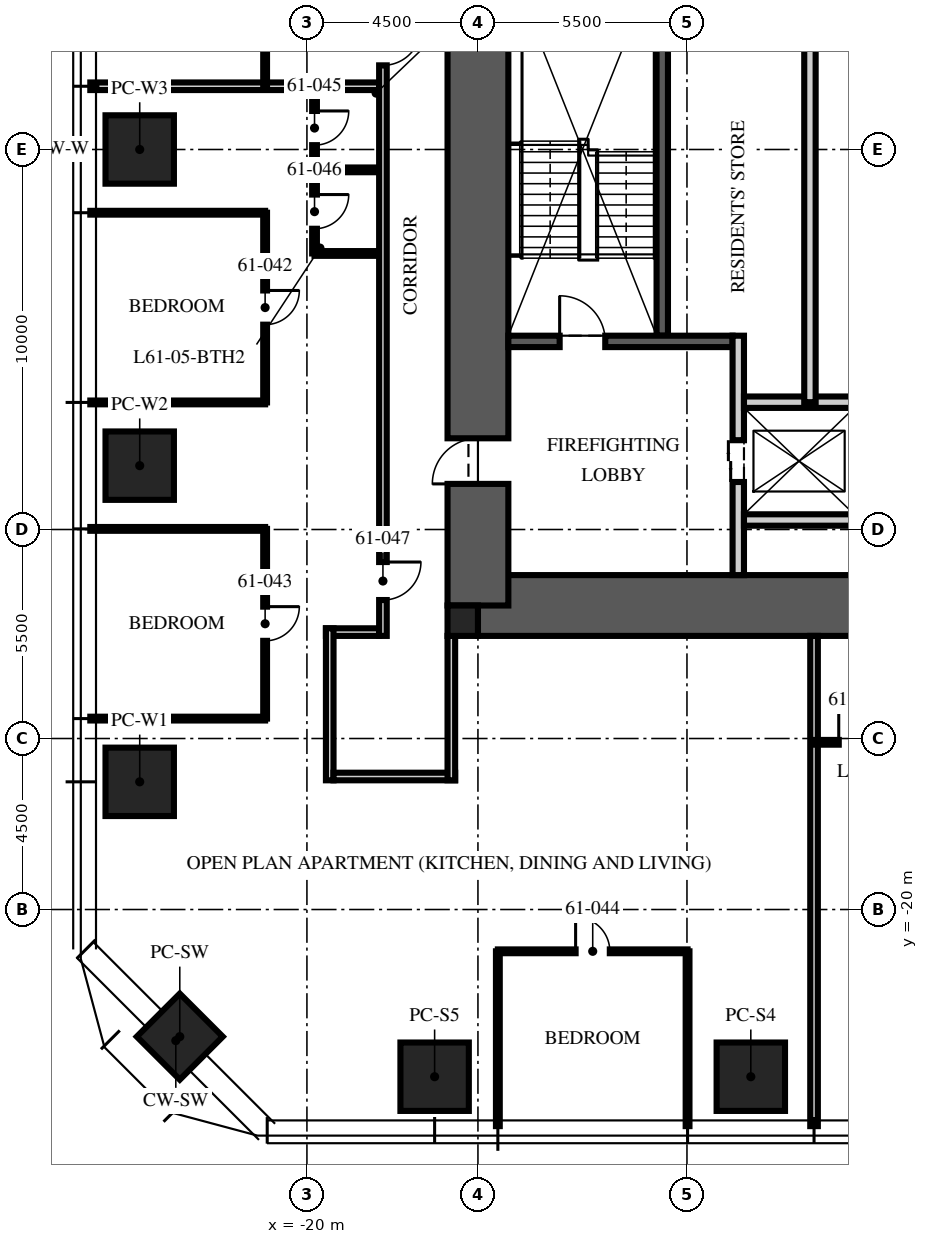
"""IFC4 building model, lengths in metres.
Left out: names, types, materials, properties, quantities, classifications, styles, units other than length and angle.
Written with IfcOpenShell. Run it as: python <this file> out.ifc"""

import sys

from ifc_helpers import new_model, si_unit, direction, frame, frame_2d, origin, origin_2d, place, context, subcontext, project, spatial, rectangle, extrude, element, fill, save


model = new_model("IFC4")
c1 = context("Model", 3, precision=1e-05, world=origin(), true_north=direction((0.0, 1.0)))
c2 = subcontext(c1, "Body", "Model", "MODEL_VIEW")
j1 = project(units=[si_unit("LENGTHUNIT", "METRE"), si_unit("PLANEANGLEUNIT", "RADIAN")], contexts=[c1])
p1 = place(None, origin())
s1 = spatial("IfcSite", under=j1, at=p1, CompositionType="ELEMENT")
p2 = place(p1, origin())
s2 = spatial("IfcBuilding", under=s1, at=p2, CompositionType="ELEMENT")
p3 = place(p2, frame((0.0, 0.0, 244.5)))
s3 = spatial("IfcBuildingStorey", under=s2, at=p3, CompositionType="ELEMENT", Elevation=244.5)
p4 = place(p3, frame((-15.5, -12.0, -0.25), z_axis=(0.0, 0.0, 1.0), x_axis=(1.0, 0.0, 0.0)))
e1 = element("IfcWall", 1, at=p4, inside=s3, PredefinedType="SHEAR", context=c2, shape_type="SweptSolid", body=[
    extrude(rectangle(XDim=31.0, YDim=1.6, at=frame_2d((15.5, 0.0))), origin(), (0.0, 0.0, 1.0), 3.75),
])
p5 = place(p3, frame((-15.5, -12.0, -0.25), z_axis=(0.0, 0.0, 1.0), x_axis=(0.0, 1.0, 0.0)))
e2 = element("IfcWall", 2, at=p5, inside=s3, PredefinedType="SHEAR", context=c2, shape_type="SweptSolid", body=[
    extrude(rectangle(XDim=24.0, YDim=1.6, at=frame_2d((12.0, 0.0))), origin(), (0.0, 0.0, 1.0), 3.75),
])
p6 = place(p5, frame((3.2, 0.0, 0.25)))
e3 = element("IfcOpeningElement", 3, at=p6, cuts=e2, PredefinedType="OPENING", context=c2, shape_type="SweptSolid", body=[
    extrude(rectangle(XDim=1.2, YDim=2.1, at=frame_2d((0.6, 1.05))), frame((0.0, 0.81, 0.0), z_axis=(0.0, -1.0, 0.0), x_axis=(1.0, 0.0, 0.0)), (0.0, 0.0, 1.0), 1.62),
])
p7 = place(p5, frame((19.3, 0.0, 0.25)))
e4 = element("IfcOpeningElement", 4, at=p7, cuts=e2, PredefinedType="OPENING", context=c2, shape_type="SweptSolid", body=[
    extrude(rectangle(XDim=1.8, YDim=2.1, at=frame_2d((0.9, 1.05))), frame((0.0, 0.81, 0.0), z_axis=(0.0, -1.0, 0.0), x_axis=(1.0, 0.0, 0.0)), (0.0, 0.0, 1.0), 1.62),
])
p8 = place(p3, frame((-15.9, -12.4, -0.25), z_axis=(0.0, 0.0, 1.0), x_axis=(1.0, 0.0, 0.0)))
e5 = element("IfcColumn", 5, at=p8, inside=s3, PredefinedType="COLUMN", context=c2, shape_type="SweptSolid", body=[
    extrude(rectangle(XDim=0.8, YDim=0.8, at=origin_2d()), origin(), (0.0, 0.0, 1.0), 3.75),
])
for number, where, z_axis, x_axis in (
    (6, (-8.32, -24.4, 0.0), (0.0, 0.0, 1.0), (1.0, 0.0, 0.0)),
    (7, (-16.64, -24.4, 0.0), (0.0, 0.0, 1.0), (1.0, 0.0, 0.0)),
    (8, (-24.4, -16.64, 0.0), (0.0, 0.0, 1.0), (0.0, 1.0, 0.0)),
    (9, (-24.4, -8.32, 0.0), (0.0, 0.0, 1.0), (0.0, 1.0, 0.0)),
    (10, (-24.4, 0.0, 0.0), (0.0, 0.0, 1.0), (0.0, 1.0, 0.0)),
):
    element("IfcColumn", number, at=place(p3, frame(where, z_axis=z_axis, x_axis=x_axis)), inside=s3, PredefinedType="COLUMN", context=c2, shape_type="SweptSolid", body=[
        extrude(rectangle(XDim=1.8, YDim=1.8, at=origin_2d()), origin(), (0.0, 0.0, 1.0), 3.75),
    ])
p9 = place(p3, frame((-23.346, -23.346, 0.0), z_axis=(0.0, 0.0, 1.0), x_axis=(0.707106781187, -0.707106781187, 0.0)))
e11 = element("IfcColumn", 11, at=p9, inside=s3, PredefinedType="COLUMN", context=c2, shape_type="SweptSolid", body=[
    extrude(rectangle(XDim=1.6, YDim=1.6, at=origin_2d()), origin(), (0.0, 0.0, 1.0), 3.75),
])
p10 = place(p3, frame((-10.65, -4.9, 0.0), z_axis=(0.0, 0.0, 1.0), x_axis=(0.0, 1.0, 0.0)))
e12 = element("IfcWall", 12, at=p10, inside=s3, PredefinedType="SOLIDWALL", context=c2, shape_type="SweptSolid", body=[
    extrude(rectangle(XDim=10.1, YDim=0.3, at=frame_2d((5.05, 0.0))), origin(), (0.0, 0.0, 1.0), 3.5),
])
p11 = place(p3, frame((-14.7, -5.05, 0.0), z_axis=(0.0, 0.0, 1.0), x_axis=(1.0, 0.0, 0.0)))
e13 = element("IfcWall", 13, at=p11, inside=s3, PredefinedType="SOLIDWALL", context=c2, shape_type="SweptSolid", body=[
    extrude(rectangle(XDim=5.9, YDim=0.3, at=frame_2d((2.95, 0.0))), origin(), (0.0, 0.0, 1.0), 3.5),
])
p12 = place(p11, frame((1.35, 0.0, 0.0)))
e14 = element("IfcOpeningElement", 14, at=p12, cuts=e13, PredefinedType="OPENING", context=c2, shape_type="SweptSolid", body=[
    extrude(rectangle(XDim=1.2, YDim=2.1, at=frame_2d((0.6, 1.05))), frame((0.0, 0.16, 0.0), z_axis=(0.0, -1.0, 0.0), x_axis=(1.0, 0.0, 0.0)), (0.0, 0.0, 1.0), 0.32),
])
p13 = place(p3, frame((-8.65, -11.2, 0.0), z_axis=(0.0, 0.0, 1.0), x_axis=(0.0, 1.0, 0.0)))
e15 = element("IfcWall", 15, at=p13, inside=s3, PredefinedType="PARTITIONING", context=c2, shape_type="SweptSolid", body=[
    extrude(rectangle(XDim=6.3, YDim=0.3, at=frame_2d((3.15, 0.0))), origin(), (0.0, 0.0, 1.0), 3.5),
])
p14 = place(p13, frame((2.45, 0.0, 0.0)))
e16 = element("IfcOpeningElement", 16, at=p14, cuts=e15, PredefinedType="OPENING", context=c2, shape_type="SweptSolid", body=[
    extrude(rectangle(XDim=1.1, YDim=2.1, at=frame_2d((0.55, 1.05))), frame((0.0, 0.16, 0.0), z_axis=(0.0, -1.0, 0.0), x_axis=(1.0, 0.0, 0.0)), (0.0, 0.0, 1.0), 0.32),
])
p15 = place(p3, frame((-8.5, -6.65, 0.0), z_axis=(0.0, 0.0, 1.0), x_axis=(1.0, 0.0, 0.0)))
e17 = element("IfcWall", 17, at=p15, inside=s3, PredefinedType="PARTITIONING", context=c2, shape_type="SweptSolid", body=[
    extrude(rectangle(XDim=17.0, YDim=0.3, at=frame_2d((8.5, 0.0))), origin(), (0.0, 0.0, 1.0), 3.5),
])
p16 = place(p15, frame((7.8, 0.0, 0.0)))
e18 = element("IfcOpeningElement", 18, at=p16, cuts=e17, PredefinedType="OPENING", context=c2, shape_type="SweptSolid", body=[
    extrude(rectangle(XDim=1.3, YDim=2.4, at=frame_2d((0.65, 1.2))), frame((0.0, 0.16, 0.0), z_axis=(0.0, -1.0, 0.0), x_axis=(1.0, 0.0, 0.0)), (0.0, 0.0, 1.0), 0.32),
])
p17 = place(p15, frame((5.65, 0.0, 0.0)))
e19 = element("IfcOpeningElement", 19, at=p17, cuts=e17, PredefinedType="OPENING", context=c2, shape_type="SweptSolid", body=[
    extrude(rectangle(XDim=0.9, YDim=2.1, at=frame_2d((0.45, 1.05))), frame((0.0, 0.16, 0.0), z_axis=(0.0, -1.0, 0.0), x_axis=(1.0, 0.0, 0.0)), (0.0, 0.0, 1.0), 0.32),
])
p18 = place(p15, frame((10.4, 0.0, 0.0)))
e20 = element("IfcOpeningElement", 20, at=p18, cuts=e17, PredefinedType="OPENING", context=c2, shape_type="SweptSolid", body=[
    extrude(rectangle(XDim=0.9, YDim=2.1, at=frame_2d((0.45, 1.05))), frame((0.0, 0.16, 0.0), z_axis=(0.0, -1.0, 0.0), x_axis=(1.0, 0.0, 0.0)), (0.0, 0.0, 1.0), 0.32),
])
p19 = place(p3, frame((-8.5, -9.75, 0.0), z_axis=(0.0, 0.0, 1.0), x_axis=(1.0, 0.0, 0.0)))
e21 = element("IfcWall", 21, at=p19, inside=s3, PredefinedType="PARTITIONING", context=c2, shape_type="SweptSolid", body=[
    extrude(rectangle(XDim=2.9, YDim=0.3, at=frame_2d((1.45, 0.0))), origin(), (0.0, 0.0, 1.0), 3.5),
])
p20 = place(p3, frame((-6.764, -6.65, 0.0), z_axis=(0.0, 0.0, 1.0), x_axis=(0.0, 1.0, 0.0)))
e22 = element("IfcWall", 22, at=p20, inside=s3, PredefinedType="PARTITIONING", context=c2, shape_type="SweptSolid", body=[
    extrude(rectangle(XDim=9.45, YDim=0.3, at=frame_2d((4.725, 0.0))), origin(), (0.0, 0.0, 1.0), 3.5),
])
p21 = place(p3, frame((-18.1, -12.7, 0.0), z_axis=(0.0, 0.0, 1.0), x_axis=(-1.0, 0.0, 0.0)))
e23 = element("IfcWall", 23, at=p21, inside=s3, PredefinedType="PARTITIONING", context=c2, shape_type="SweptSolid", body=[
    extrude(rectangle(XDim=1.4, YDim=0.2, at=frame_2d((0.7, 0.0))), origin(), (0.0, 0.0, 1.0), 2.81),
])
p22 = place(p3, frame((-19.4, -12.6, 0.0), z_axis=(0.0, 0.0, 1.0), x_axis=(0.0, -1.0, 0.0)))
e24 = element("IfcWall", 24, at=p22, inside=s3, PredefinedType="PARTITIONING", context=c2, shape_type="SweptSolid", body=[
    extrude(rectangle(XDim=4.0, YDim=0.2, at=frame_2d((2.0, 0.0))), origin(), (0.0, 0.0, 1.0), 2.6),
])
p23 = place(p3, frame((-19.3, -16.5, 0.0), z_axis=(0.0, 0.0, 1.0), x_axis=(1.0, 0.0, 0.0)))
e25 = element("IfcWall", 25, at=p23, inside=s3, PredefinedType="PARTITIONING", context=c2, shape_type="SweptSolid", body=[
    extrude(rectangle(XDim=3.2, YDim=0.2, at=frame_2d((1.6, 0.0))), origin(), (0.0, 0.0, 1.0), 2.3),
])
p24 = place(p3, frame((-16.2, -16.6, 0.0), z_axis=(0.0, 0.0, 1.0), x_axis=(0.0, 1.0, 0.0)))
e26 = element("IfcWall", 26, at=p24, inside=s3, PredefinedType="PARTITIONING", context=c2, shape_type="SweptSolid", body=[
    extrude(rectangle(XDim=3.8, YDim=0.2, at=frame_2d((1.9, 0.0))), origin(), (0.0, 0.0, 1.0), 2.3),
])
p25 = place(p3, frame((-18.1, 1.664, 0.0), z_axis=(0.0, 0.0, 1.0), x_axis=(-1.0, 0.0, 0.0)))
e27 = element("IfcWall", 27, at=p25, inside=s3, PredefinedType="PARTITIONING", context=c2, shape_type="SweptSolid", body=[
    extrude(rectangle(XDim=7.6, YDim=0.2, at=frame_2d((3.8, 0.0))), origin(), (0.0, 0.0, 1.0), 2.91),
])
for number, where, z_axis, x_axis in (
    (28, (-21.1, -1.664, 0.0), (0.0, 0.0, 1.0), (-1.0, 0.0, 0.0)),
    (29, (-21.1, -6.656, 0.0), (0.0, 0.0, 1.0), (-1.0, 0.0, 0.0)),
    (30, (-21.1, -9.984, 0.0), (0.0, 0.0, 1.0), (-1.0, 0.0, 0.0)),
    (31, (-21.1, -14.976, 0.0), (0.0, 0.0, 1.0), (-1.0, 0.0, 0.0)),
    (32, (-14.976, -21.1, 0.0), (0.0, 0.0, 1.0), (0.0, -1.0, 0.0)),
    (33, (-9.984, -21.1, 0.0), (0.0, 0.0, 1.0), (0.0, -1.0, 0.0)),
):
    element("IfcWall", number, at=place(p3, frame(where, z_axis=z_axis, x_axis=x_axis)), inside=s3, PredefinedType="PARTITIONING", context=c2, shape_type="SweptSolid", body=[
        extrude(rectangle(XDim=4.6, YDim=0.1, at=frame_2d((2.3, 0.0))), origin(), (0.0, 0.0, 1.0), 2.91),
    ])
p26 = place(p3, frame((-6.656, -12.8, 0.0), z_axis=(0.0, 0.0, 1.0), x_axis=(0.0, -1.0, 0.0)))
e34 = element("IfcWall", 34, at=p26, inside=s3, PredefinedType="PARTITIONING", context=c2, shape_type="SweptSolid", body=[
    extrude(rectangle(XDim=12.9, YDim=0.2, at=frame_2d((6.45, 0.0))), origin(), (0.0, 0.0, 1.0), 2.91),
])
p27 = place(p3, frame((-21.1, 6.656, 0.0), z_axis=(0.0, 0.0, 1.0), x_axis=(0.0, -1.0, 0.0)))
e35 = element("IfcWall", 35, at=p27, inside=s3, PredefinedType="PARTITIONING", context=c2, shape_type="SweptSolid", body=[
    extrude(rectangle(XDim=4.992, YDim=0.1, at=frame_2d((2.496, 0.0))), origin(), (0.0, 0.0, 1.0), 2.81),
])
p28 = place(p27, frame((2.046, 0.0, 0.0)))
e36 = element("IfcOpeningElement", 36, at=p28, cuts=e35, PredefinedType="OPENING", context=c2, shape_type="SweptSolid", body=[
    extrude(rectangle(XDim=0.9, YDim=2.1, at=frame_2d((0.45, 1.05))), frame((0.0, 0.06, 0.0), z_axis=(0.0, -1.0, 0.0), x_axis=(1.0, 0.0, 0.0)), (0.0, 0.0, 1.0), 0.12),
])
p29 = place(p3, frame((-21.1, -1.664, 0.0), z_axis=(0.0, 0.0, 1.0), x_axis=(0.0, -1.0, 0.0)))
e37 = element("IfcWall", 37, at=p29, inside=s3, PredefinedType="PARTITIONING", context=c2, shape_type="SweptSolid", body=[
    extrude(rectangle(XDim=4.992, YDim=0.1, at=frame_2d((2.496, 0.0))), origin(), (0.0, 0.0, 1.0), 2.81),
])
p30 = place(p29, frame((2.046, 0.0, 0.0)))
e38 = element("IfcOpeningElement", 38, at=p30, cuts=e37, PredefinedType="OPENING", context=c2, shape_type="SweptSolid", body=[
    extrude(rectangle(XDim=0.9, YDim=2.1, at=frame_2d((0.45, 1.05))), frame((0.0, 0.06, 0.0), z_axis=(0.0, -1.0, 0.0), x_axis=(1.0, 0.0, 0.0)), (0.0, 0.0, 1.0), 0.12),
])
p31 = place(p3, frame((-21.1, -9.984, 0.0), z_axis=(0.0, 0.0, 1.0), x_axis=(0.0, -1.0, 0.0)))
e39 = element("IfcWall", 39, at=p31, inside=s3, PredefinedType="PARTITIONING", context=c2, shape_type="SweptSolid", body=[
    extrude(rectangle(XDim=4.992, YDim=0.1, at=frame_2d((2.496, 0.0))), origin(), (0.0, 0.0, 1.0), 2.81),
])
p32 = place(p31, frame((2.046, 0.0, 0.0)))
e40 = element("IfcOpeningElement", 40, at=p32, cuts=e39, PredefinedType="OPENING", context=c2, shape_type="SweptSolid", body=[
    extrude(rectangle(XDim=0.9, YDim=2.1, at=frame_2d((0.45, 1.05))), frame((0.0, 0.06, 0.0), z_axis=(0.0, -1.0, 0.0), x_axis=(1.0, 0.0, 0.0)), (0.0, 0.0, 1.0), 0.12),
])
p33 = place(p3, frame((-14.976, -21.1, 0.0), z_axis=(0.0, 0.0, 1.0), x_axis=(1.0, 0.0, 0.0)))
e41 = element("IfcWall", 41, at=p33, inside=s3, PredefinedType="PARTITIONING", context=c2, shape_type="SweptSolid", body=[
    extrude(rectangle(XDim=4.992, YDim=0.1, at=frame_2d((2.496, 0.0))), origin(), (0.0, 0.0, 1.0), 2.81),
])
p34 = place(p33, frame((2.046, 0.0, 0.0)))
e42 = element("IfcOpeningElement", 42, at=p34, cuts=e41, PredefinedType="OPENING", context=c2, shape_type="SweptSolid", body=[
    extrude(rectangle(XDim=0.9, YDim=2.1, at=frame_2d((0.45, 1.05))), frame((0.0, 0.06, 0.0), z_axis=(0.0, -1.0, 0.0), x_axis=(1.0, 0.0, 0.0)), (0.0, 0.0, 1.0), 0.12),
])
p35 = place(p3, frame((-19.8, 1.664, 0.0), z_axis=(0.0, 0.0, 1.0), x_axis=(0.0, -1.0, 0.0)))
e43 = element("IfcWall", 43, at=p35, inside=s3, PredefinedType="PARTITIONING", context=c2, shape_type="SweptSolid", body=[
    extrude(rectangle(XDim=4.4, YDim=0.125, at=frame_2d((2.2, 0.0))), origin(), (0.0, 0.0, 1.0), 2.6),
])
p36 = place(p35, frame((0.65, 0.0, 0.0)))
e44 = element("IfcOpeningElement", 44, at=p36, cuts=e43, PredefinedType="OPENING", context=c2, shape_type="SweptSolid", body=[
    extrude(rectangle(XDim=0.9, YDim=2.1, at=frame_2d((0.45, 1.05))), frame((0.0, 0.073, 0.0), z_axis=(0.0, -1.0, 0.0), x_axis=(1.0, 0.0, 0.0)), (0.0, 0.0, 1.0), 0.145),
])
p37 = place(p35, frame((2.85, 0.0, 0.0)))
e45 = element("IfcOpeningElement", 45, at=p37, cuts=e43, PredefinedType="OPENING", context=c2, shape_type="SweptSolid", body=[
    extrude(rectangle(XDim=0.9, YDim=2.1, at=frame_2d((0.45, 1.05))), frame((0.0, 0.073, 0.0), z_axis=(0.0, -1.0, 0.0), x_axis=(1.0, 0.0, 0.0)), (0.0, 0.0, 1.0), 0.145),
])
for number, where, z_axis, x_axis in (
    (46, (-18.1, -0.536, 0.0), (0.0, 0.0, 1.0), (-1.0, 0.0, 0.0)),
    (47, (-18.1, -2.736, 0.0), (0.0, 0.0, 1.0), (-1.0, 0.0, 0.0)),
):
    element("IfcWall", number, at=place(p3, frame(where, z_axis=z_axis, x_axis=x_axis)), inside=s3, PredefinedType="PARTITIONING", context=c2, shape_type="SweptSolid", body=[
        extrude(rectangle(XDim=1.7, YDim=0.125, at=frame_2d((0.85, 0.0))), origin(), (0.0, 0.0, 1.0), 3.5),
    ])
p38 = place(p3, frame((-6.656, -15.6, 0.0), z_axis=(0.0, 0.0, 1.0), x_axis=(1.0, 0.0, 0.0)))
e48 = element("IfcWall", 48, at=p38, inside=s3, PredefinedType="PARTITIONING", context=c2, shape_type="SweptSolid", body=[
    extrude(rectangle(XDim=2.2, YDim=0.125, at=frame_2d((1.1, 0.0))), origin(), (0.0, 0.0, 1.0), 3.5),
])
p39 = place(p38, frame((0.65, 0.0, 0.0)))
e49 = element("IfcOpeningElement", 49, at=p39, cuts=e48, PredefinedType="OPENING", context=c2, shape_type="SweptSolid", body=[
    extrude(rectangle(XDim=0.9, YDim=2.1, at=frame_2d((0.45, 1.05))), frame((0.0, 0.073, 0.0), z_axis=(0.0, -1.0, 0.0), x_axis=(1.0, 0.0, 0.0)), (0.0, 0.0, 1.0), 0.145),
])
p40 = place(p3, frame((-18.0, 13.0, 0.0), z_axis=(0.0, 0.0, 1.0), x_axis=(0.0, -1.0, 0.0)))
e50 = element("IfcWall", 50, at=p40, inside=s3, PredefinedType="PARTITIONING", context=c2, shape_type="SweptSolid", body=[
    extrude(rectangle(XDim=25.8, YDim=0.2, at=frame_2d((12.9, 0.0))), origin(), (0.0, 0.0, 1.0), 2.6),
])
p41 = place(p40, frame((1.35, 0.0, 0.0)))
e51 = element("IfcOpeningElement", 51, at=p41, cuts=e50, PredefinedType="OPENING", context=c2, shape_type="SweptSolid", body=[
    extrude(rectangle(XDim=1.0, YDim=2.2, at=frame_2d((0.5, 1.1))), frame((0.0, 0.11, 0.0), z_axis=(0.0, -1.0, 0.0), x_axis=(1.0, 0.0, 0.0)), (0.0, 0.0, 1.0), 0.22),
])
p42 = place(p40, frame((9.786, 0.0, 0.0)))
e52 = element("IfcOpeningElement", 52, at=p42, cuts=e50, PredefinedType="OPENING", context=c2, shape_type="SweptSolid", body=[
    extrude(rectangle(XDim=1.0, YDim=2.2, at=frame_2d((0.5, 1.1))), frame((0.0, 0.11, 0.0), z_axis=(0.0, -1.0, 0.0), x_axis=(1.0, 0.0, 0.0)), (0.0, 0.0, 1.0), 0.22),
])
p43 = place(p40, frame((23.856, 0.0, 0.0)))
e53 = element("IfcOpeningElement", 53, at=p43, cuts=e50, PredefinedType="OPENING", context=c2, shape_type="SweptSolid", body=[
    extrude(rectangle(XDim=1.0, YDim=2.2, at=frame_2d((0.5, 1.1))), frame((0.0, 0.11, 0.0), z_axis=(0.0, -1.0, 0.0), x_axis=(1.0, 0.0, 0.0)), (0.0, 0.0, 1.0), 0.22),
])
p44 = place(p12, origin())
e54 = element("IfcDoor", 54, at=p44, inside=s3, OperationType="SINGLE_SWING_LEFT", PredefinedType="DOOR", context=c2, shape_type="SweptSolid", body=[
    extrude(rectangle(XDim=1.2, YDim=2.1, at=frame_2d((0.6, 1.05))), frame((0.0, 0.025, 0.0), z_axis=(0.0, -1.0, 0.0), x_axis=(1.0, 0.0, 0.0)), (0.0, 0.0, 1.0), 0.05),
])
fill(e14, e54)
p45 = place(p6, origin())
e55 = element("IfcDoor", 55, at=p45, inside=s3, OperationType="SINGLE_SWING_LEFT", PredefinedType="DOOR", context=c2, shape_type="SweptSolid", body=[
    extrude(rectangle(XDim=1.2, YDim=2.1, at=frame_2d((0.6, 1.05))), frame((0.0, 0.025, 0.0), z_axis=(0.0, -1.0, 0.0), x_axis=(1.0, 0.0, 0.0)), (0.0, 0.0, 1.0), 0.05),
])
fill(e3, e55)
p46 = place(p14, origin())
e56 = element("IfcDoor", 56, at=p46, inside=s3, OperationType="DOUBLE_DOOR_SLIDING", PredefinedType="DOOR", context=c2, shape_type="SweptSolid", body=[
    extrude(rectangle(XDim=1.1, YDim=2.1, at=frame_2d((0.55, 1.05))), frame((0.0, 0.025, 0.0), z_axis=(0.0, -1.0, 0.0), x_axis=(1.0, 0.0, 0.0)), (0.0, 0.0, 1.0), 0.05),
])
fill(e16, e56)
p47 = place(p42, origin())
e57 = element("IfcDoor", 57, at=p47, inside=s3, OperationType="SINGLE_SWING_LEFT", PredefinedType="DOOR", context=c2, shape_type="SweptSolid", body=[
    extrude(rectangle(XDim=1.0, YDim=2.2, at=frame_2d((0.5, 1.1))), frame((0.0, 0.025, 0.0), z_axis=(0.0, -1.0, 0.0), x_axis=(1.0, 0.0, 0.0)), (0.0, 0.0, 1.0), 0.05),
])
fill(e52, e57)
p48 = place(p30, origin())
e58 = element("IfcDoor", 58, at=p48, inside=s3, OperationType="SINGLE_SWING_LEFT", PredefinedType="DOOR", context=c2, shape_type="SweptSolid", body=[
    extrude(rectangle(XDim=0.9, YDim=2.1, at=frame_2d((0.45, 1.05))), frame((0.0, 0.025, 0.0), z_axis=(0.0, -1.0, 0.0), x_axis=(1.0, 0.0, 0.0)), (0.0, 0.0, 1.0), 0.05),
])
fill(e38, e58)
p49 = place(p32, origin())
e59 = element("IfcDoor", 59, at=p49, inside=s3, OperationType="SINGLE_SWING_LEFT", PredefinedType="DOOR", context=c2, shape_type="SweptSolid", body=[
    extrude(rectangle(XDim=0.9, YDim=2.1, at=frame_2d((0.45, 1.05))), frame((0.0, 0.025, 0.0), z_axis=(0.0, -1.0, 0.0), x_axis=(1.0, 0.0, 0.0)), (0.0, 0.0, 1.0), 0.05),
])
fill(e40, e59)
p50 = place(p34, origin())
e60 = element("IfcDoor", 60, at=p50, inside=s3, OperationType="SINGLE_SWING_LEFT", PredefinedType="DOOR", context=c2, shape_type="SweptSolid", body=[
    extrude(rectangle(XDim=0.9, YDim=2.1, at=frame_2d((0.45, 1.05))), frame((0.0, 0.025, 0.0), z_axis=(0.0, -1.0, 0.0), x_axis=(1.0, 0.0, 0.0)), (0.0, 0.0, 1.0), 0.05),
])
fill(e42, e60)
p51 = place(p36, origin())
e61 = element("IfcDoor", 61, at=p51, inside=s3, OperationType="SINGLE_SWING_LEFT", PredefinedType="DOOR", context=c2, shape_type="SweptSolid", body=[
    extrude(rectangle(XDim=0.9, YDim=2.1, at=frame_2d((0.45, 1.05))), frame((0.0, 0.025, 0.0), z_axis=(0.0, -1.0, 0.0), x_axis=(1.0, 0.0, 0.0)), (0.0, 0.0, 1.0), 0.05),
])
fill(e44, e61)
p52 = place(p37, origin())
e62 = element("IfcDoor", 62, at=p52, inside=s3, OperationType="SINGLE_SWING_LEFT", PredefinedType="DOOR", context=c2, shape_type="SweptSolid", body=[
    extrude(rectangle(XDim=0.9, YDim=2.1, at=frame_2d((0.45, 1.05))), frame((0.0, 0.025, 0.0), z_axis=(0.0, -1.0, 0.0), x_axis=(1.0, 0.0, 0.0)), (0.0, 0.0, 1.0), 0.05),
])
fill(e45, e62)
p53 = place(p43, origin())
e63 = element("IfcDoor", 63, at=p53, inside=s3, OperationType="SINGLE_SWING_LEFT", PredefinedType="DOOR", context=c2, shape_type="SweptSolid", body=[
    extrude(rectangle(XDim=1.0, YDim=2.2, at=frame_2d((0.5, 1.1))), frame((0.0, 0.025, 0.0), z_axis=(0.0, -1.0, 0.0), x_axis=(1.0, 0.0, 0.0)), (0.0, 0.0, 1.0), 0.05),
])
fill(e53, e63)
p54 = place(p39, origin())
e64 = element("IfcDoor", 64, at=p54, inside=s3, OperationType="SINGLE_SWING_LEFT", PredefinedType="DOOR", context=c2, shape_type="SweptSolid", body=[
    extrude(rectangle(XDim=0.9, YDim=2.1, at=frame_2d((0.45, 1.05))), frame((0.0, 0.025, 0.0), z_axis=(0.0, -1.0, 0.0), x_axis=(1.0, 0.0, 0.0)), (0.0, 0.0, 1.0), 0.05),
])
fill(e49, e64)
save(model, sys.argv[1])
